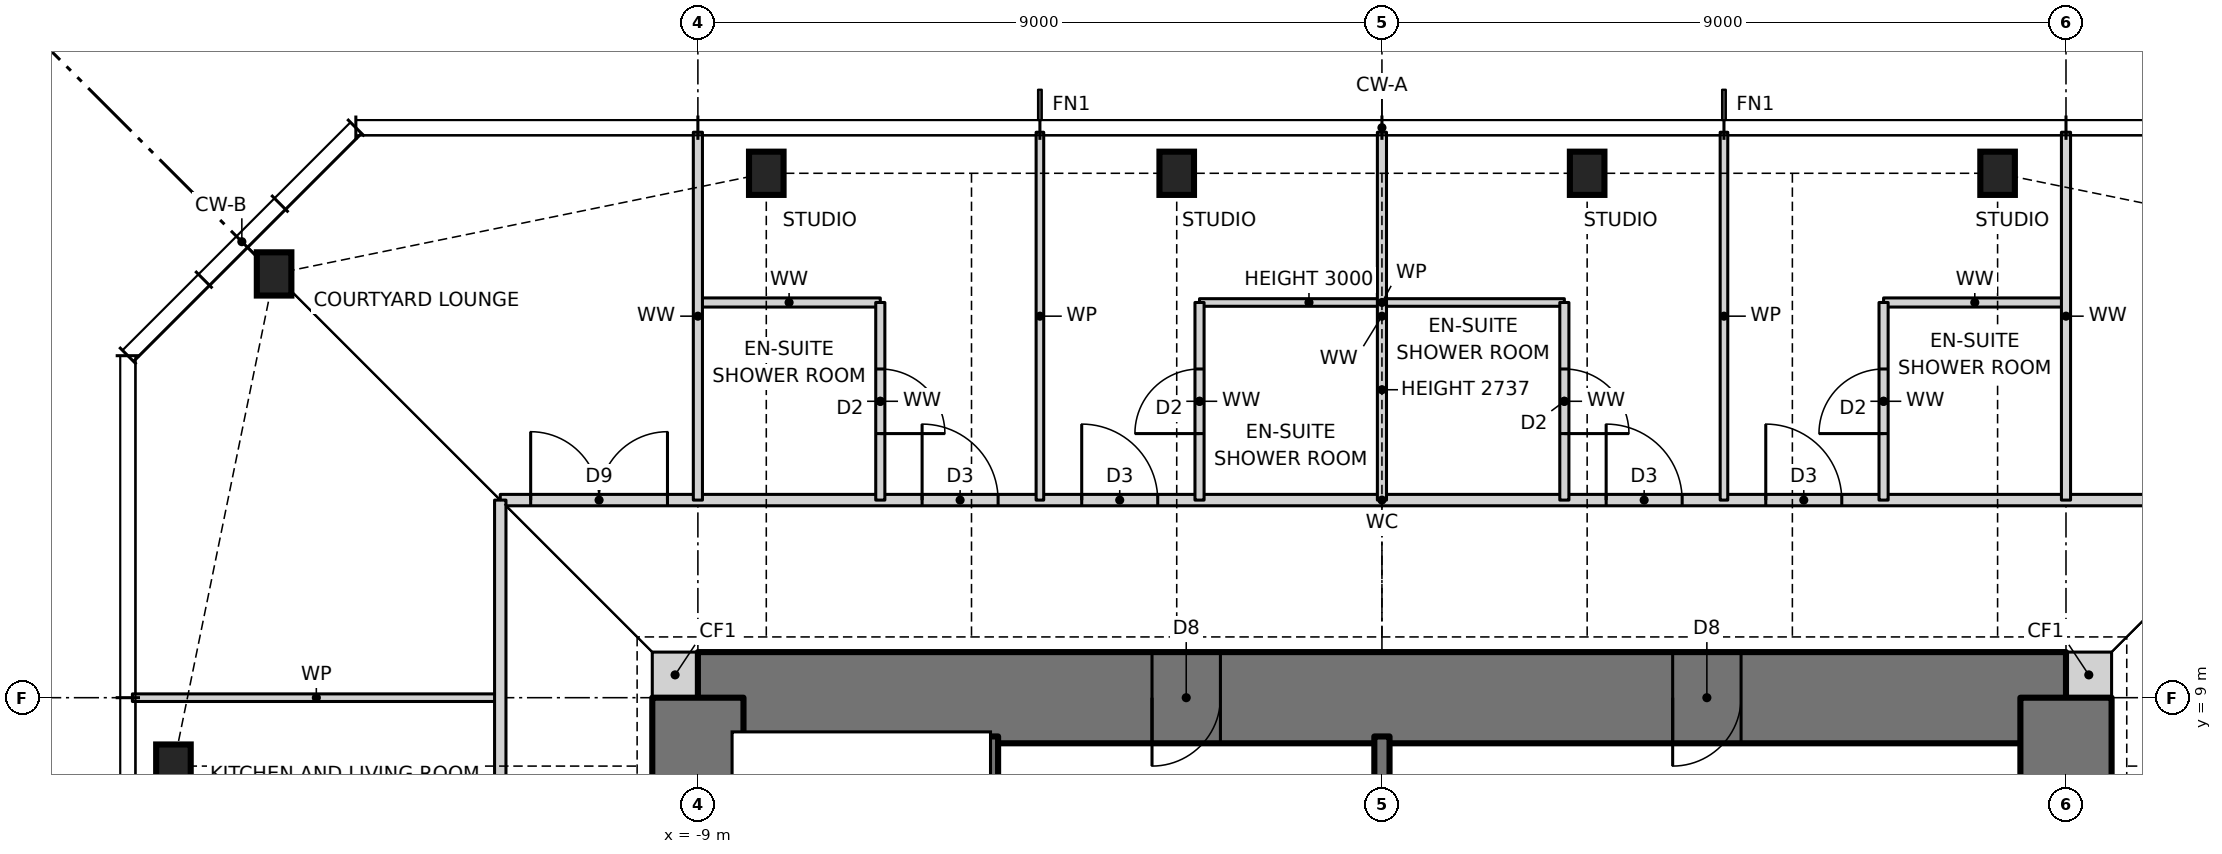
"""IFC4 building model, lengths in metres.
Left out: names, types, materials, properties, quantities, classifications, styles, units other than length and angle.
Written with IfcOpenShell. Run it as: python <this file> out.ifc"""

import sys

from ifc_helpers import new_model, si_unit, direction, frame, frame_2d, origin, origin_2d, place, context, subcontext, project, spatial, rectangle, i_section, extrude, element, fill, save


model = new_model("IFC4")
c1 = context("Model", 3, precision=1e-05, world=origin(), true_north=direction((0.0, 1.0)))
c2 = subcontext(c1, "Body", "Model", "MODEL_VIEW")
j1 = project(units=[si_unit("LENGTHUNIT", "METRE"), si_unit("PLANEANGLEUNIT", "RADIAN")], contexts=[c1])
p1 = place(None, origin())
s1 = spatial("IfcSite", under=j1, at=p1, CompositionType="ELEMENT")
p2 = place(p1, origin())
s2 = spatial("IfcBuilding", under=s1, at=p2, CompositionType="ELEMENT")
p3 = place(p2, frame((0.0, 0.0, 222.0)))
s3 = spatial("IfcBuildingStorey", under=s2, at=p3, CompositionType="ELEMENT", Elevation=222.0)
for number, where, z_axis, x_axis in (
    (1, (8.1, 15.9, 0.0), (0.0, 0.0, 1.0), (1.0, 0.0, 0.0)),
    (2, (2.7, 15.9, 0.0), (0.0, 0.0, 1.0), (1.0, 0.0, 0.0)),
    (3, (-2.7, 15.9, 0.0), (0.0, 0.0, 1.0), (1.0, 0.0, 0.0)),
    (4, (-8.1, 15.9, 0.0), (0.0, 0.0, 1.0), (1.0, 0.0, 0.0)),
    (5, (-14.576, 14.576, 0.0), (0.0, 0.0, 1.0), (1.0, 0.0, 0.0)),
    (6, (-15.9, 8.1, 0.0), (0.0, 0.0, 1.0), (1.0, 0.0, 0.0)),
):
    element("IfcColumn", number, at=place(p3, frame(where, z_axis=z_axis, x_axis=x_axis)), inside=s3, PredefinedType="COLUMN", context=c2, shape_type="SweptSolid", body=[
        extrude(i_section(OverallWidth=0.455, OverallDepth=0.569, WebThickness=0.078, FlangeThickness=0.125, at=origin_2d()), origin(), (0.0, 0.0, 1.0), 3.5),
    ])
for number, where, z_axis, x_axis in (
    (7, (9.0, 9.3, 0.0), (0.0, 0.0, 1.0), (1.0, 0.0, 0.0)),
    (8, (-9.6, 9.3, 0.0), (0.0, 0.0, 1.0), (1.0, 0.0, 0.0)),
):
    element("IfcWall", number, at=place(p3, frame(where, z_axis=z_axis, x_axis=x_axis)), inside=s3, PredefinedType="SOLIDWALL", context=c2, shape_type="SweptSolid", body=[
        extrude(rectangle(XDim=0.6, YDim=0.6, at=frame_2d((0.3, 0.0))), origin(), (0.0, 0.0, 1.0), 3.5),
    ])
p4 = place(p3, frame((9.0, 9.0, 0.0), z_axis=(0.0, 0.0, 1.0), x_axis=(-1.0, 0.0, 0.0)))
e9 = element("IfcWall", 9, at=p4, inside=s3, PredefinedType="SHEAR", context=c2, shape_type="SweptSolid", body=[
    extrude(rectangle(XDim=18.0, YDim=1.2, at=frame_2d((9.0, 0.0))), origin(), (0.0, 0.0, 1.0), 3.5),
])
p5 = place(p4, frame((11.125, 0.0, 0.0)))
e10 = element("IfcOpeningElement", 10, at=p5, cuts=e9, PredefinedType="OPENING", context=c2, shape_type="SweptSolid", body=[
    extrude(rectangle(XDim=0.9, YDim=2.1, at=frame_2d((0.45, 1.05))), frame((0.0, 0.61, 0.0), z_axis=(0.0, -1.0, 0.0), x_axis=(1.0, 0.0, 0.0)), (0.0, 0.0, 1.0), 1.22),
])
p6 = place(p4, frame((4.275, 0.0, 0.0)))
e11 = element("IfcOpeningElement", 11, at=p6, cuts=e9, PredefinedType="OPENING", context=c2, shape_type="SweptSolid", body=[
    extrude(rectangle(XDim=0.9, YDim=2.1, at=frame_2d((0.45, 1.05))), frame((0.0, 0.61, 0.0), z_axis=(0.0, -1.0, 0.0), x_axis=(1.0, 0.0, 0.0)), (0.0, 0.0, 1.0), 1.22),
])
p7 = place(p3, frame((9.0, -9.0, 0.0), z_axis=(0.0, 0.0, 1.0), x_axis=(0.0, 1.0, 0.0)))
e12 = element("IfcWall", 12, at=p7, inside=s3, PredefinedType="SHEAR", context=c2, shape_type="SweptSolid", body=[
    extrude(rectangle(XDim=18.0, YDim=1.2, at=frame_2d((9.0, 0.0))), origin(), (0.0, 0.0, 1.0), 3.5),
])
p8 = place(p7, frame((8.5, 0.0, 0.0)))
e13 = element("IfcOpeningElement", 13, at=p8, cuts=e12, PredefinedType="OPENING", context=c2, shape_type="SweptSolid", body=[
    extrude(rectangle(XDim=1.0, YDim=2.1, at=frame_2d((0.5, 1.05))), frame((0.0, 0.61, 0.0), z_axis=(0.0, -1.0, 0.0), x_axis=(1.0, 0.0, 0.0)), (0.0, 0.0, 1.0), 1.22),
])
p9 = place(p3, frame((-9.0, 9.0, 0.0), z_axis=(0.0, 0.0, 1.0), x_axis=(0.0, -1.0, 0.0)))
e14 = element("IfcWall", 14, at=p9, inside=s3, PredefinedType="SHEAR", context=c2, shape_type="SweptSolid", body=[
    extrude(rectangle(XDim=18.0, YDim=1.2, at=frame_2d((9.0, 0.0))), origin(), (0.0, 0.0, 1.0), 3.5),
])
p10 = place(p9, frame((8.5, 0.0, 0.0)))
e15 = element("IfcOpeningElement", 15, at=p10, cuts=e14, PredefinedType="OPENING", context=c2, shape_type="SweptSolid", body=[
    extrude(rectangle(XDim=1.0, YDim=2.1, at=frame_2d((0.5, 1.05))), frame((0.0, 0.61, 0.0), z_axis=(0.0, -1.0, 0.0), x_axis=(1.0, 0.0, 0.0)), (0.0, 0.0, 1.0), 1.22),
])
p11 = place(p3, frame((-16.44, 9.0, 0.0), z_axis=(0.0, 0.0, 1.0), x_axis=(1.0, 0.0, 0.0)))
e16 = element("IfcWall", 16, at=p11, inside=s3, PredefinedType="PARTITIONING", context=c2, shape_type="SweptSolid", body=[
    extrude(rectangle(XDim=4.84, YDim=0.1, at=frame_2d((2.42, 0.0))), origin(), (0.0, 0.0, 1.0), 3.27),
])
p12 = place(p3, frame((-11.6, 11.6, 0.0), z_axis=(0.0, 0.0, 1.0), x_axis=(1.0, 0.0, 0.0)))
e17 = element("IfcWall", 17, at=p12, inside=s3, PredefinedType="PARTITIONING", context=c2, shape_type="SweptSolid", body=[
    extrude(rectangle(XDim=23.2, YDim=0.15, at=frame_2d((11.6, 0.0))), origin(), (0.0, 0.0, 1.0), 3.27),
])
p13 = place(p12, frame((16.65, 0.0, 0.0)))
e18 = element("IfcOpeningElement", 18, at=p13, cuts=e17, PredefinedType="OPENING", context=c2, shape_type="SweptSolid", body=[
    extrude(rectangle(XDim=1.0, YDim=2.1, at=frame_2d((0.5, 1.05))), frame((0.0, 0.085, 0.0), z_axis=(0.0, -1.0, 0.0), x_axis=(1.0, 0.0, 0.0)), (0.0, 0.0, 1.0), 0.17),
])
p14 = place(p12, frame((14.55, 0.0, 0.0)))
e19 = element("IfcOpeningElement", 19, at=p14, cuts=e17, PredefinedType="OPENING", context=c2, shape_type="SweptSolid", body=[
    extrude(rectangle(XDim=1.0, YDim=2.1, at=frame_2d((0.5, 1.05))), frame((0.0, 0.085, 0.0), z_axis=(0.0, -1.0, 0.0), x_axis=(1.0, 0.0, 0.0)), (0.0, 0.0, 1.0), 0.17),
])
p15 = place(p12, frame((7.65, 0.0, 0.0)))
e20 = element("IfcOpeningElement", 20, at=p15, cuts=e17, PredefinedType="OPENING", context=c2, shape_type="SweptSolid", body=[
    extrude(rectangle(XDim=1.0, YDim=2.1, at=frame_2d((0.5, 1.05))), frame((0.0, 0.085, 0.0), z_axis=(0.0, -1.0, 0.0), x_axis=(1.0, 0.0, 0.0)), (0.0, 0.0, 1.0), 0.17),
])
p16 = place(p12, frame((5.55, 0.0, 0.0)))
e21 = element("IfcOpeningElement", 21, at=p16, cuts=e17, PredefinedType="OPENING", context=c2, shape_type="SweptSolid", body=[
    extrude(rectangle(XDim=1.0, YDim=2.1, at=frame_2d((0.5, 1.05))), frame((0.0, 0.085, 0.0), z_axis=(0.0, -1.0, 0.0), x_axis=(1.0, 0.0, 0.0)), (0.0, 0.0, 1.0), 0.17),
])
p17 = place(p12, frame((0.4, 0.0, 0.0)))
e22 = element("IfcOpeningElement", 22, at=p17, cuts=e17, PredefinedType="OPENING", context=c2, shape_type="SweptSolid", body=[
    extrude(rectangle(XDim=1.8, YDim=2.1, at=frame_2d((0.9, 1.05))), frame((0.0, 0.085, 0.0), z_axis=(0.0, -1.0, 0.0), x_axis=(1.0, 0.0, 0.0)), (0.0, 0.0, 1.0), 0.17),
])
p18 = place(p3, frame((-9.0, 14.2, 0.0), z_axis=(0.0, 0.0, 1.0), x_axis=(1.0, 0.0, 0.0)))
e23 = element("IfcWall", 23, at=p18, inside=s3, PredefinedType="PARTITIONING", context=c2, shape_type="SweptSolid", body=[
    extrude(rectangle(XDim=2.4, YDim=0.12, at=frame_2d((1.2, 0.0))), origin(), (0.0, 0.0, 1.0), 3.27),
])
p19 = place(p3, frame((-2.4, 14.2, 0.0), z_axis=(0.0, 0.0, 1.0), x_axis=(1.0, 0.0, 0.0)))
e24 = element("IfcWall", 24, at=p19, inside=s3, PredefinedType="PARTITIONING", context=c2, shape_type="SweptSolid", body=[
    extrude(rectangle(XDim=4.8, YDim=0.1, at=frame_2d((2.4, 0.0))), origin(), (0.0, 0.0, 1.0), 3.0),
])
p20 = place(p3, frame((6.6, 14.2, 0.0), z_axis=(0.0, 0.0, 1.0), x_axis=(1.0, 0.0, 0.0)))
e25 = element("IfcWall", 25, at=p20, inside=s3, PredefinedType="PARTITIONING", context=c2, shape_type="SweptSolid", body=[
    extrude(rectangle(XDim=2.4, YDim=0.12, at=frame_2d((1.2, 0.0))), origin(), (0.0, 0.0, 1.0), 3.27),
])
p21 = place(p3, frame((9.0, 11.6, 0.0), z_axis=(0.0, 0.0, 1.0), x_axis=(0.0, 1.0, 0.0)))
e26 = element("IfcWall", 26, at=p21, inside=s3, PredefinedType="PARTITIONING", context=c2, shape_type="SweptSolid", body=[
    extrude(rectangle(XDim=4.84, YDim=0.12, at=frame_2d((2.42, 0.0))), origin(), (0.0, 0.0, 1.0), 3.27),
])
p22 = place(p3, frame((6.6, 11.6, 0.0), z_axis=(0.0, 0.0, 1.0), x_axis=(0.0, 1.0, 0.0)))
e27 = element("IfcWall", 27, at=p22, inside=s3, PredefinedType="PARTITIONING", context=c2, shape_type="SweptSolid", body=[
    extrude(rectangle(XDim=2.6, YDim=0.12, at=frame_2d((1.3, 0.0))), origin(), (0.0, 0.0, 1.0), 3.27),
])
p23 = place(p22, frame((0.875, 0.0, 0.0)))
e28 = element("IfcOpeningElement", 28, at=p23, cuts=e27, PredefinedType="OPENING", context=c2, shape_type="SweptSolid", body=[
    extrude(rectangle(XDim=0.85, YDim=2.1, at=frame_2d((0.425, 1.05))), frame((0.0, 0.07, 0.0), z_axis=(0.0, -1.0, 0.0), x_axis=(1.0, 0.0, 0.0)), (0.0, 0.0, 1.0), 0.14),
])
p24 = place(p3, frame((4.5, 11.6, 0.0), z_axis=(0.0, 0.0, 1.0), x_axis=(0.0, 1.0, 0.0)))
e29 = element("IfcWall", 29, at=p24, inside=s3, PredefinedType="PARTITIONING", context=c2, shape_type="SweptSolid", body=[
    extrude(rectangle(XDim=4.84, YDim=0.1, at=frame_2d((2.42, 0.0))), origin(), (0.0, 0.0, 1.0), 3.27),
])
p25 = place(p3, frame((2.4, 11.6, 0.0), z_axis=(0.0, 0.0, 1.0), x_axis=(0.0, 1.0, 0.0)))
e30 = element("IfcWall", 30, at=p25, inside=s3, PredefinedType="PARTITIONING", context=c2, shape_type="SweptSolid", body=[
    extrude(rectangle(XDim=2.6, YDim=0.12, at=frame_2d((1.3, 0.0))), origin(), (0.0, 0.0, 1.0), 3.27),
])
p26 = place(p25, frame((0.875, 0.0, 0.0)))
e31 = element("IfcOpeningElement", 31, at=p26, cuts=e30, PredefinedType="OPENING", context=c2, shape_type="SweptSolid", body=[
    extrude(rectangle(XDim=0.85, YDim=2.1, at=frame_2d((0.425, 1.05))), frame((0.0, 0.07, 0.0), z_axis=(0.0, -1.0, 0.0), x_axis=(1.0, 0.0, 0.0)), (0.0, 0.0, 1.0), 0.14),
])
p27 = place(p3, frame((0.0, 4.4, 0.0), z_axis=(0.0, 0.0, 1.0), x_axis=(0.0, 1.0, 0.0)))
e32 = element("IfcWall", 32, at=p27, inside=s3, PredefinedType="SOLIDWALL", context=c2, shape_type="SweptSolid", body=[
    extrude(rectangle(XDim=4.09, YDim=0.2, at=frame_2d((2.045, 0.0))), origin(), (0.0, 0.0, 1.0), 3.5),
])
p28 = place(p3, frame((0.0, 11.6, 0.0), z_axis=(0.0, 0.0, 1.0), x_axis=(0.0, 1.0, 0.0)))
e33 = element("IfcWall", 33, at=p28, inside=s3, PredefinedType="PARTITIONING", context=c2, shape_type="SweptSolid", body=[
    extrude(rectangle(XDim=4.84, YDim=0.12, at=frame_2d((2.42, 0.0))), origin(), (0.0, 0.0, 1.0), 2.737),
])
p29 = place(p3, frame((-2.4, 11.6, 0.0), z_axis=(0.0, 0.0, 1.0), x_axis=(0.0, 1.0, 0.0)))
e34 = element("IfcWall", 34, at=p29, inside=s3, PredefinedType="PARTITIONING", context=c2, shape_type="SweptSolid", body=[
    extrude(rectangle(XDim=2.6, YDim=0.12, at=frame_2d((1.3, 0.0))), origin(), (0.0, 0.0, 1.0), 3.27),
])
p30 = place(p29, frame((0.875, 0.0, 0.0)))
e35 = element("IfcOpeningElement", 35, at=p30, cuts=e34, PredefinedType="OPENING", context=c2, shape_type="SweptSolid", body=[
    extrude(rectangle(XDim=0.85, YDim=2.1, at=frame_2d((0.425, 1.05))), frame((0.0, 0.07, 0.0), z_axis=(0.0, -1.0, 0.0), x_axis=(1.0, 0.0, 0.0)), (0.0, 0.0, 1.0), 0.14),
])
p31 = place(p3, frame((-4.5, 11.6, 0.0), z_axis=(0.0, 0.0, 1.0), x_axis=(0.0, 1.0, 0.0)))
e36 = element("IfcWall", 36, at=p31, inside=s3, PredefinedType="PARTITIONING", context=c2, shape_type="SweptSolid", body=[
    extrude(rectangle(XDim=4.84, YDim=0.1, at=frame_2d((2.42, 0.0))), origin(), (0.0, 0.0, 1.0), 3.27),
])
p32 = place(p3, frame((-5.15, 1.6, 0.0), z_axis=(0.0, 0.0, 1.0), x_axis=(0.0, 1.0, 0.0)))
e37 = element("IfcWall", 37, at=p32, inside=s3, PredefinedType="SOLIDWALL", context=c2, shape_type="SweptSolid", body=[
    extrude(rectangle(XDim=6.89, YDim=0.2, at=frame_2d((3.445, 0.0))), origin(), (0.0, 0.0, 1.0), 3.5),
])
p33 = place(p3, frame((-6.6, 11.6, 0.0), z_axis=(0.0, 0.0, 1.0), x_axis=(0.0, 1.0, 0.0)))
e38 = element("IfcWall", 38, at=p33, inside=s3, PredefinedType="PARTITIONING", context=c2, shape_type="SweptSolid", body=[
    extrude(rectangle(XDim=2.6, YDim=0.12, at=frame_2d((1.3, 0.0))), origin(), (0.0, 0.0, 1.0), 3.27),
])
p34 = place(p33, frame((0.875, 0.0, 0.0)))
e39 = element("IfcOpeningElement", 39, at=p34, cuts=e38, PredefinedType="OPENING", context=c2, shape_type="SweptSolid", body=[
    extrude(rectangle(XDim=0.85, YDim=2.1, at=frame_2d((0.425, 1.05))), frame((0.0, 0.07, 0.0), z_axis=(0.0, -1.0, 0.0), x_axis=(1.0, 0.0, 0.0)), (0.0, 0.0, 1.0), 0.14),
])
p35 = place(p3, frame((-9.0, 11.6, 0.0), z_axis=(0.0, 0.0, 1.0), x_axis=(0.0, 1.0, 0.0)))
e40 = element("IfcWall", 40, at=p35, inside=s3, PredefinedType="PARTITIONING", context=c2, shape_type="SweptSolid", body=[
    extrude(rectangle(XDim=4.84, YDim=0.12, at=frame_2d((2.42, 0.0))), origin(), (0.0, 0.0, 1.0), 3.27),
])
p36 = place(p3, frame((-11.6, -11.6, 0.0), z_axis=(0.0, 0.0, 1.0), x_axis=(0.0, 1.0, 0.0)))
e41 = element("IfcWall", 41, at=p36, inside=s3, PredefinedType="PARTITIONING", context=c2, shape_type="SweptSolid", body=[
    extrude(rectangle(XDim=23.2, YDim=0.15, at=frame_2d((11.6, 0.0))), origin(), (0.0, 0.0, 1.0), 3.27),
])
p37 = place(p36, frame((16.5, 0.0, 0.0)))
e42 = element("IfcOpeningElement", 42, at=p37, cuts=e41, PredefinedType="OPENING", context=c2, shape_type="SweptSolid", body=[
    extrude(rectangle(XDim=1.0, YDim=2.1, at=frame_2d((0.5, 1.05))), frame((0.0, 0.085, 0.0), z_axis=(0.0, -1.0, 0.0), x_axis=(1.0, 0.0, 0.0)), (0.0, 0.0, 1.0), 0.17),
])
p38 = place(p36, frame((10.05, 0.0, 0.0)))
e43 = element("IfcOpeningElement", 43, at=p38, cuts=e41, PredefinedType="OPENING", context=c2, shape_type="SweptSolid", body=[
    extrude(rectangle(XDim=1.0, YDim=2.1, at=frame_2d((0.5, 1.05))), frame((0.0, 0.085, 0.0), z_axis=(0.0, -1.0, 0.0), x_axis=(1.0, 0.0, 0.0)), (0.0, 0.0, 1.0), 0.17),
])
p39 = place(p36, frame((3.15, 0.0, 0.0)))
e44 = element("IfcOpeningElement", 44, at=p39, cuts=e41, PredefinedType="OPENING", context=c2, shape_type="SweptSolid", body=[
    extrude(rectangle(XDim=1.0, YDim=2.1, at=frame_2d((0.5, 1.05))), frame((0.0, 0.085, 0.0), z_axis=(0.0, -1.0, 0.0), x_axis=(1.0, 0.0, 0.0)), (0.0, 0.0, 1.0), 0.17),
])
p40 = place(p36, frame((0.875, 0.0, 0.0)))
e45 = element("IfcOpeningElement", 45, at=p40, cuts=e41, PredefinedType="OPENING", context=c2, shape_type="SweptSolid", body=[
    extrude(rectangle(XDim=0.85, YDim=2.1, at=frame_2d((0.425, 1.05))), frame((0.0, 0.085, 0.0), z_axis=(0.0, -1.0, 0.0), x_axis=(1.0, 0.0, 0.0)), (0.0, 0.0, 1.0), 0.17),
])
p41 = place(p13, origin())
e46 = element("IfcDoor", 46, at=p41, inside=s3, OperationType="SINGLE_SWING_LEFT", PredefinedType="DOOR", context=c2, shape_type="SweptSolid", body=[
    extrude(rectangle(XDim=1.0, YDim=2.1, at=frame_2d((0.5, 1.05))), frame((0.0, 0.025, 0.0), z_axis=(0.0, -1.0, 0.0), x_axis=(1.0, 0.0, 0.0)), (0.0, 0.0, 1.0), 0.05),
])
fill(e18, e46)
p42 = place(p23, origin())
e47 = element("IfcDoor", 47, at=p42, inside=s3, OperationType="SINGLE_SWING_LEFT", PredefinedType="DOOR", context=c2, shape_type="SweptSolid", body=[
    extrude(rectangle(XDim=0.85, YDim=2.1, at=frame_2d((0.425, 1.05))), frame((0.0, 0.025, 0.0), z_axis=(0.0, -1.0, 0.0), x_axis=(1.0, 0.0, 0.0)), (0.0, 0.0, 1.0), 0.05),
])
fill(e28, e47)
p43 = place(p14, origin())
e48 = element("IfcDoor", 48, at=p43, inside=s3, OperationType="SINGLE_SWING_LEFT", PredefinedType="DOOR", context=c2, shape_type="SweptSolid", body=[
    extrude(rectangle(XDim=1.0, YDim=2.1, at=frame_2d((0.5, 1.05))), frame((0.0, 0.025, 0.0), z_axis=(0.0, -1.0, 0.0), x_axis=(1.0, 0.0, 0.0)), (0.0, 0.0, 1.0), 0.05),
])
fill(e19, e48)
p44 = place(p26, frame((0.85, 0.0, 0.0), z_axis=(0.0, 0.0, 1.0), x_axis=(-1.0, 0.0, 0.0)))
e49 = element("IfcDoor", 49, at=p44, inside=s3, OperationType="SINGLE_SWING_RIGHT", PredefinedType="DOOR", context=c2, shape_type="SweptSolid", body=[
    extrude(rectangle(XDim=0.85, YDim=2.1, at=frame_2d((0.425, 1.05))), frame((0.0, 0.025, 0.0), z_axis=(0.0, -1.0, 0.0), x_axis=(1.0, 0.0, 0.0)), (0.0, 0.0, 1.0), 0.05),
])
fill(e31, e49)
p45 = place(p15, origin())
e50 = element("IfcDoor", 50, at=p45, inside=s3, OperationType="SINGLE_SWING_LEFT", PredefinedType="DOOR", context=c2, shape_type="SweptSolid", body=[
    extrude(rectangle(XDim=1.0, YDim=2.1, at=frame_2d((0.5, 1.05))), frame((0.0, 0.025, 0.0), z_axis=(0.0, -1.0, 0.0), x_axis=(1.0, 0.0, 0.0)), (0.0, 0.0, 1.0), 0.05),
])
fill(e20, e50)
p46 = place(p30, origin())
e51 = element("IfcDoor", 51, at=p46, inside=s3, OperationType="SINGLE_SWING_LEFT", PredefinedType="DOOR", context=c2, shape_type="SweptSolid", body=[
    extrude(rectangle(XDim=0.85, YDim=2.1, at=frame_2d((0.425, 1.05))), frame((0.0, 0.025, 0.0), z_axis=(0.0, -1.0, 0.0), x_axis=(1.0, 0.0, 0.0)), (0.0, 0.0, 1.0), 0.05),
])
fill(e35, e51)
p47 = place(p16, origin())
e52 = element("IfcDoor", 52, at=p47, inside=s3, OperationType="SINGLE_SWING_LEFT", PredefinedType="DOOR", context=c2, shape_type="SweptSolid", body=[
    extrude(rectangle(XDim=1.0, YDim=2.1, at=frame_2d((0.5, 1.05))), frame((0.0, 0.025, 0.0), z_axis=(0.0, -1.0, 0.0), x_axis=(1.0, 0.0, 0.0)), (0.0, 0.0, 1.0), 0.05),
])
fill(e21, e52)
p48 = place(p34, frame((0.85, 0.0, 0.0), z_axis=(0.0, 0.0, 1.0), x_axis=(-1.0, 0.0, 0.0)))
e53 = element("IfcDoor", 53, at=p48, inside=s3, OperationType="SINGLE_SWING_RIGHT", PredefinedType="DOOR", context=c2, shape_type="SweptSolid", body=[
    extrude(rectangle(XDim=0.85, YDim=2.1, at=frame_2d((0.425, 1.05))), frame((0.0, 0.025, 0.0), z_axis=(0.0, -1.0, 0.0), x_axis=(1.0, 0.0, 0.0)), (0.0, 0.0, 1.0), 0.05),
])
fill(e39, e53)
p49 = place(p17, origin())
e54 = element("IfcDoor", 54, at=p49, inside=s3, OperationType="DOUBLE_DOOR_SINGLE_SWING", PredefinedType="DOOR", context=c2, shape_type="SweptSolid", body=[
    extrude(rectangle(XDim=1.8, YDim=2.1, at=frame_2d((0.9, 1.05))), frame((0.0, 0.025, 0.0), z_axis=(0.0, -1.0, 0.0), x_axis=(1.0, 0.0, 0.0)), (0.0, 0.0, 1.0), 0.05),
])
fill(e22, e54)
p50 = place(p5, origin())
e55 = element("IfcDoor", 55, at=p50, inside=s3, OperationType="SINGLE_SWING_RIGHT", PredefinedType="DOOR", context=c2, shape_type="SweptSolid", body=[
    extrude(rectangle(XDim=0.9, YDim=2.1, at=frame_2d((0.45, 1.05))), frame((0.0, 0.025, 0.0), z_axis=(0.0, -1.0, 0.0), x_axis=(1.0, 0.0, 0.0)), (0.0, 0.0, 1.0), 0.05),
])
fill(e10, e55)
p51 = place(p6, origin())
e56 = element("IfcDoor", 56, at=p51, inside=s3, OperationType="SINGLE_SWING_RIGHT", PredefinedType="DOOR", context=c2, shape_type="SweptSolid", body=[
    extrude(rectangle(XDim=0.9, YDim=2.1, at=frame_2d((0.45, 1.05))), frame((0.0, 0.025, 0.0), z_axis=(0.0, -1.0, 0.0), x_axis=(1.0, 0.0, 0.0)), (0.0, 0.0, 1.0), 0.05),
])
fill(e11, e56)
save(model, sys.argv[1])
